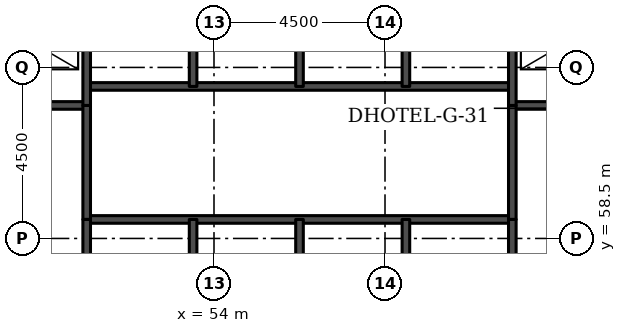
"""IFC4 building model, lengths in metres.
Left out: names, types, materials, properties, quantities, classifications, styles, units other than length and angle.
Written with IfcOpenShell. Run it as: python <this file> out.ifc"""

import sys

from ifc_helpers import new_model, si_unit, direction, frame, frame_2d, origin, place, context, subcontext, project, spatial, rectangle, extrude, element, save


model = new_model("IFC4")
c1 = context("Model", 3, precision=1e-05, world=origin(), true_north=direction((0.0, 1.0)))
c2 = subcontext(c1, "Body", "Model", "MODEL_VIEW")
j1 = project(units=[si_unit("LENGTHUNIT", "METRE"), si_unit("PLANEANGLEUNIT", "RADIAN")], contexts=[c1])
p1 = place(None, origin())
s1 = spatial("IfcSite", under=j1, at=p1, CompositionType="ELEMENT")
p2 = place(p1, origin())
s2 = spatial("IfcBuilding", under=s1, at=p2, CompositionType="ELEMENT")
p3 = place(p2, frame((0.0, 0.0, 66.0)))
s3 = spatial("IfcBuildingStorey", under=s2, at=p3, CompositionType="ELEMENT", Elevation=66.0)
p4 = place(p3, frame((50.65, 59.0, 0.0), z_axis=(0.0, 0.0, 1.0), x_axis=(1.0, 0.0, 0.0)))
e1 = element("IfcWall", 1, at=p4, inside=s3, PredefinedType="SOLIDWALL", context=c2, shape_type="SweptSolid", body=[
    extrude(rectangle(XDim=11.2, YDim=0.2, at=frame_2d((5.6, 0.0))), origin(), (0.0, 0.0, 1.0), 3.3),
])
for number, where, z_axis, x_axis in (
    (2, (45.5, 62.0, 0.0), (0.0, 0.0, 1.0), (1.0, 0.0, 0.0)),
    (3, (61.85, 62.0, 0.0), (0.0, 0.0, 1.0), (1.0, 0.0, 0.0)),
):
    element("IfcWall", number, at=place(p3, frame(where, z_axis=z_axis, x_axis=x_axis)), inside=s3, PredefinedType="SOLIDWALL", context=c2, shape_type="SweptSolid", body=[
        extrude(rectangle(XDim=5.15, YDim=0.2, at=frame_2d((2.575, 0.0))), origin(), (0.0, 0.0, 1.0), 3.08),
    ])
p5 = place(p3, frame((50.65, 62.5, 0.0), z_axis=(0.0, 0.0, 1.0), x_axis=(1.0, 0.0, 0.0)))
e4 = element("IfcWall", 4, at=p5, inside=s3, PredefinedType="SOLIDWALL", context=c2, shape_type="SweptSolid", body=[
    extrude(rectangle(XDim=11.2, YDim=0.2, at=frame_2d((5.6, 0.0))), origin(), (0.0, 0.0, 1.0), 3.3),
])
p6 = place(p3, frame((50.65, 59.0, 0.0), z_axis=(0.0, 0.0, 1.0), x_axis=(0.0, 1.0, 0.0)))
e5 = element("IfcWall", 5, at=p6, inside=s3, PredefinedType="SOLIDWALL", context=c2, shape_type="SweptSolid", body=[
    extrude(rectangle(XDim=3.0, YDim=0.2, at=frame_2d((1.5, 0.0))), origin(), (0.0, 0.0, 1.0), 3.3),
])
p7 = place(p3, frame((50.65, 56.2, 0.0), z_axis=(0.0, 0.0, 1.0), x_axis=(0.0, 1.0, 0.0)))
e6 = element("IfcWall", 6, at=p7, inside=s3, PredefinedType="SOLIDWALL", context=c2, shape_type="SweptSolid", body=[
    extrude(rectangle(XDim=2.8, YDim=0.2, at=frame_2d((1.4, 0.0))), origin(), (0.0, 0.0, 1.0), 3.08),
])
p8 = place(p3, frame((50.65, 62.0, 0.0), z_axis=(0.0, 0.0, 1.0), x_axis=(0.0, 1.0, 0.0)))
e7 = element("IfcWall", 7, at=p8, inside=s3, PredefinedType="SOLIDWALL", context=c2, shape_type="SweptSolid", body=[
    extrude(rectangle(XDim=3.3, YDim=0.2, at=frame_2d((1.65, 0.0))), origin(), (0.0, 0.0, 1.0), 3.08),
])
for number, where, z_axis, x_axis in (
    (8, (53.45, 56.2, 0.0), (0.0, 0.0, 1.0), (0.0, 1.0, 0.0)),
    (9, (53.45, 62.5, 0.0), (0.0, 0.0, 1.0), (0.0, 1.0, 0.0)),
    (10, (56.25, 56.2, 0.0), (0.0, 0.0, 1.0), (0.0, 1.0, 0.0)),
    (11, (56.25, 62.5, 0.0), (0.0, 0.0, 1.0), (0.0, 1.0, 0.0)),
    (12, (59.05, 56.2, 0.0), (0.0, 0.0, 1.0), (0.0, 1.0, 0.0)),
    (13, (59.05, 62.5, 0.0), (0.0, 0.0, 1.0), (0.0, 1.0, 0.0)),
):
    element("IfcWall", number, at=place(p3, frame(where, z_axis=z_axis, x_axis=x_axis)), inside=s3, PredefinedType="SOLIDWALL", context=c2, shape_type="SweptSolid", body=[
        extrude(rectangle(XDim=2.8, YDim=0.2, at=frame_2d((1.4, 0.0))), origin(), (0.0, 0.0, 1.0), 3.08),
    ])
p9 = place(p3, frame((61.85, 59.0, 0.0), z_axis=(0.0, 0.0, 1.0), x_axis=(0.0, 1.0, 0.0)))
e14 = element("IfcWall", 14, at=p9, inside=s3, PredefinedType="SOLIDWALL", context=c2, shape_type="SweptSolid", body=[
    extrude(rectangle(XDim=3.0, YDim=0.2, at=frame_2d((1.5, 0.0))), origin(), (0.0, 0.0, 1.0), 3.3),
])
p10 = place(p3, frame((61.85, 56.2, 0.0), z_axis=(0.0, 0.0, 1.0), x_axis=(0.0, 1.0, 0.0)))
e15 = element("IfcWall", 15, at=p10, inside=s3, PredefinedType="SOLIDWALL", context=c2, shape_type="SweptSolid", body=[
    extrude(rectangle(XDim=2.8, YDim=0.2, at=frame_2d((1.4, 0.0))), origin(), (0.0, 0.0, 1.0), 3.08),
])
p11 = place(p3, frame((61.85, 62.0, 0.0), z_axis=(0.0, 0.0, 1.0), x_axis=(0.0, 1.0, 0.0)))
e16 = element("IfcWall", 16, at=p11, inside=s3, PredefinedType="SOLIDWALL", context=c2, shape_type="SweptSolid", body=[
    extrude(rectangle(XDim=3.3, YDim=0.2, at=frame_2d((1.65, 0.0))), origin(), (0.0, 0.0, 1.0), 3.08),
])
save(model, sys.argv[1])
